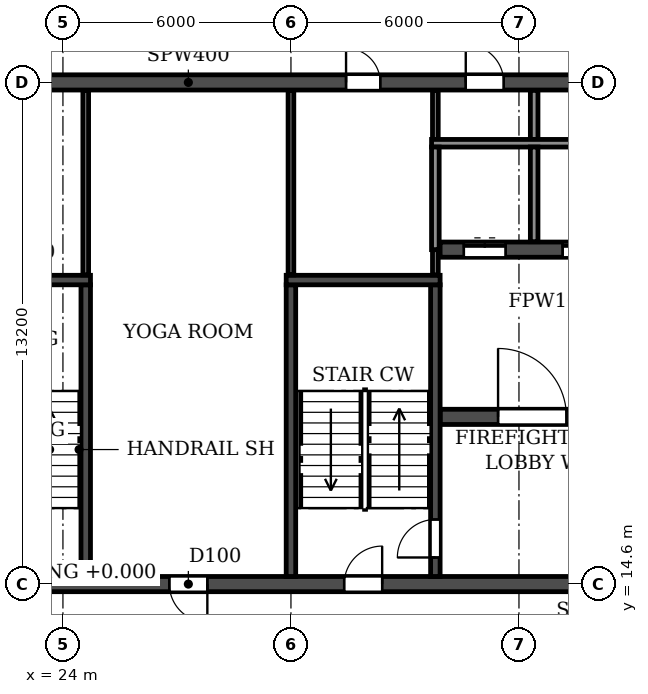
"""IFC4 building model, lengths in metres.
Left out: names, types, materials, properties, quantities, classifications, styles, units other than length and angle.
Written with IfcOpenShell. Run it as: python <this file> out.ifc"""

import sys

from ifc_helpers import new_model, si_unit, direction, frame, frame_2d, origin, place, context, subcontext, project, spatial, rectangle, extrude, element, fill, save


model = new_model("IFC4")
c1 = context("Model", 3, precision=1e-05, world=origin(), true_north=direction((0.0, 1.0)))
c2 = subcontext(c1, "Body", "Model", "MODEL_VIEW")
j1 = project(units=[si_unit("LENGTHUNIT", "METRE"), si_unit("PLANEANGLEUNIT", "RADIAN")], contexts=[c1])
p1 = place(None, origin())
s1 = spatial("IfcSite", under=j1, at=p1, CompositionType="ELEMENT")
p2 = place(p1, origin())
s2 = spatial("IfcBuilding", under=s1, at=p2, CompositionType="ELEMENT")
p3 = place(p2, frame((0.0, 0.0, 191.7)))
s3 = spatial("IfcBuildingStorey", under=s2, at=p3, CompositionType="ELEMENT", Elevation=191.7)
p4 = place(p3, frame((18.2, 14.6, 0.0), z_axis=(0.0, 0.0, 1.0), x_axis=(1.0, 0.0, 0.0)))
e1 = element("IfcWall", 1, at=p4, inside=s3, PredefinedType="SOLIDWALL", context=c2, shape_type="SweptSolid", body=[
    extrude(rectangle(XDim=65.6, YDim=0.4, at=frame_2d((32.8, 0.0))), origin(), (0.0, 0.0, 1.0), 3.08),
])
p5 = place(p4, frame((0.7, 0.0, 0.0)))
e2 = element("IfcOpeningElement", 2, at=p5, cuts=e1, PredefinedType="OPENING", context=c2, shape_type="SweptSolid", body=[
    extrude(rectangle(XDim=1.0, YDim=2.1, at=frame_2d((0.5, 1.05))), frame((0.0, 0.21, 0.0), z_axis=(0.0, -1.0, 0.0), x_axis=(1.0, 0.0, 0.0)), (0.0, 0.0, 1.0), 0.42),
])
p6 = place(p4, frame((8.6, 0.0, 0.0)))
e3 = element("IfcOpeningElement", 3, at=p6, cuts=e1, PredefinedType="OPENING", context=c2, shape_type="SweptSolid", body=[
    extrude(rectangle(XDim=1.0, YDim=2.1, at=frame_2d((0.5, 1.05))), frame((0.0, 0.21, 0.0), z_axis=(0.0, -1.0, 0.0), x_axis=(1.0, 0.0, 0.0)), (0.0, 0.0, 1.0), 0.42),
])
p7 = place(p4, frame((13.2, 0.0, 0.0)))
e4 = element("IfcOpeningElement", 4, at=p7, cuts=e1, PredefinedType="OPENING", context=c2, shape_type="SweptSolid", body=[
    extrude(rectangle(XDim=1.0, YDim=2.1, at=frame_2d((0.5, 1.05))), frame((0.0, 0.21, 0.0), z_axis=(0.0, -1.0, 0.0), x_axis=(1.0, 0.0, 0.0)), (0.0, 0.0, 1.0), 0.42),
])
p8 = place(p4, frame((25.55, 0.0, 0.0)))
e5 = element("IfcOpeningElement", 5, at=p8, cuts=e1, PredefinedType="OPENING", context=c2, shape_type="SweptSolid", body=[
    extrude(rectangle(XDim=1.5, YDim=2.1, at=frame_2d((0.75, 1.05))), frame((0.0, 0.21, 0.0), z_axis=(0.0, -1.0, 0.0), x_axis=(1.0, 0.0, 0.0)), (0.0, 0.0, 1.0), 0.42),
])
p9 = place(p4, frame((29.7, 0.0, 0.0)))
e6 = element("IfcOpeningElement", 6, at=p9, cuts=e1, PredefinedType="OPENING", context=c2, shape_type="SweptSolid", body=[
    extrude(rectangle(XDim=1.0, YDim=2.1, at=frame_2d((0.5, 1.05))), frame((0.0, 0.21, 0.0), z_axis=(0.0, -1.0, 0.0), x_axis=(1.0, 0.0, 0.0)), (0.0, 0.0, 1.0), 0.42),
])
p10 = place(p4, frame((32.3, 0.0, 0.0)))
e7 = element("IfcOpeningElement", 7, at=p10, cuts=e1, PredefinedType="OPENING", context=c2, shape_type="SweptSolid", body=[
    extrude(rectangle(XDim=1.0, YDim=2.1, at=frame_2d((0.5, 1.05))), frame((0.0, 0.21, 0.0), z_axis=(0.0, -1.0, 0.0), x_axis=(1.0, 0.0, 0.0)), (0.0, 0.0, 1.0), 0.42),
])
p11 = place(p4, frame((34.9, 0.0, 0.0)))
e8 = element("IfcOpeningElement", 8, at=p11, cuts=e1, PredefinedType="OPENING", context=c2, shape_type="SweptSolid", body=[
    extrude(rectangle(XDim=1.0, YDim=2.1, at=frame_2d((0.5, 1.05))), frame((0.0, 0.21, 0.0), z_axis=(0.0, -1.0, 0.0), x_axis=(1.0, 0.0, 0.0)), (0.0, 0.0, 1.0), 0.42),
])
p12 = place(p4, frame((38.55, 0.0, 0.0)))
e9 = element("IfcOpeningElement", 9, at=p12, cuts=e1, PredefinedType="OPENING", context=c2, shape_type="SweptSolid", body=[
    extrude(rectangle(XDim=1.5, YDim=2.1, at=frame_2d((0.75, 1.05))), frame((0.0, 0.21, 0.0), z_axis=(0.0, -1.0, 0.0), x_axis=(1.0, 0.0, 0.0)), (0.0, 0.0, 1.0), 0.42),
])
p13 = place(p4, frame((51.4, 0.0, 0.0)))
e10 = element("IfcOpeningElement", 10, at=p13, cuts=e1, PredefinedType="OPENING", context=c2, shape_type="SweptSolid", body=[
    extrude(rectangle(XDim=1.0, YDim=2.1, at=frame_2d((0.5, 1.05))), frame((0.0, 0.21, 0.0), z_axis=(0.0, -1.0, 0.0), x_axis=(1.0, 0.0, 0.0)), (0.0, 0.0, 1.0), 0.42),
])
p14 = place(p4, frame((56.0, 0.0, 0.0)))
e11 = element("IfcOpeningElement", 11, at=p14, cuts=e1, PredefinedType="OPENING", context=c2, shape_type="SweptSolid", body=[
    extrude(rectangle(XDim=1.0, YDim=2.1, at=frame_2d((0.5, 1.05))), frame((0.0, 0.21, 0.0), z_axis=(0.0, -1.0, 0.0), x_axis=(1.0, 0.0, 0.0)), (0.0, 0.0, 1.0), 0.42),
])
p15 = place(p4, frame((63.9, 0.0, 0.0)))
e12 = element("IfcOpeningElement", 12, at=p15, cuts=e1, PredefinedType="OPENING", context=c2, shape_type="SweptSolid", body=[
    extrude(rectangle(XDim=1.0, YDim=2.1, at=frame_2d((0.5, 1.05))), frame((0.0, 0.21, 0.0), z_axis=(0.0, -1.0, 0.0), x_axis=(1.0, 0.0, 0.0)), (0.0, 0.0, 1.0), 0.42),
])
p16 = place(p3, frame((18.2, 27.8, 0.0), z_axis=(0.0, 0.0, 1.0), x_axis=(1.0, 0.0, 0.0)))
e13 = element("IfcWall", 13, at=p16, inside=s3, PredefinedType="SOLIDWALL", context=c2, shape_type="SweptSolid", body=[
    extrude(rectangle(XDim=65.6, YDim=0.4, at=frame_2d((32.8, 0.0))), origin(), (0.0, 0.0, 1.0), 3.08),
])
p17 = place(p16, frame((0.7, 0.0, 0.0)))
e14 = element("IfcOpeningElement", 14, at=p17, cuts=e13, PredefinedType="OPENING", context=c2, shape_type="SweptSolid", body=[
    extrude(rectangle(XDim=1.0, YDim=2.1, at=frame_2d((0.5, 1.05))), frame((0.0, 0.21, 0.0), z_axis=(0.0, -1.0, 0.0), x_axis=(1.0, 0.0, 0.0)), (0.0, 0.0, 1.0), 0.42),
])
p18 = place(p16, frame((4.05, 0.0, 0.0)))
e15 = element("IfcOpeningElement", 15, at=p18, cuts=e13, PredefinedType="OPENING", context=c2, shape_type="SweptSolid", body=[
    extrude(rectangle(XDim=0.9, YDim=2.1, at=frame_2d((0.45, 1.05))), frame((0.0, 0.21, 0.0), z_axis=(0.0, -1.0, 0.0), x_axis=(1.0, 0.0, 0.0)), (0.0, 0.0, 1.0), 0.42),
])
p19 = place(p16, frame((13.25, 0.0, 0.0)))
e16 = element("IfcOpeningElement", 16, at=p19, cuts=e13, PredefinedType="OPENING", context=c2, shape_type="SweptSolid", body=[
    extrude(rectangle(XDim=0.9, YDim=2.1, at=frame_2d((0.45, 1.05))), frame((0.0, 0.21, 0.0), z_axis=(0.0, -1.0, 0.0), x_axis=(1.0, 0.0, 0.0)), (0.0, 0.0, 1.0), 0.42),
])
p20 = place(p16, frame((16.4, 0.0, 0.0)))
e17 = element("IfcOpeningElement", 17, at=p20, cuts=e13, PredefinedType="OPENING", context=c2, shape_type="SweptSolid", body=[
    extrude(rectangle(XDim=1.0, YDim=2.1, at=frame_2d((0.5, 1.05))), frame((0.0, 0.21, 0.0), z_axis=(0.0, -1.0, 0.0), x_axis=(1.0, 0.0, 0.0)), (0.0, 0.0, 1.0), 0.42),
])
p21 = place(p16, frame((21.6, 0.0, 0.0)))
e18 = element("IfcOpeningElement", 18, at=p21, cuts=e13, PredefinedType="OPENING", context=c2, shape_type="SweptSolid", body=[
    extrude(rectangle(XDim=1.0, YDim=2.1, at=frame_2d((0.5, 1.05))), frame((0.0, 0.21, 0.0), z_axis=(0.0, -1.0, 0.0), x_axis=(1.0, 0.0, 0.0)), (0.0, 0.0, 1.0), 0.42),
])
p22 = place(p16, frame((29.4, 0.0, 0.0)))
e19 = element("IfcOpeningElement", 19, at=p22, cuts=e13, PredefinedType="OPENING", context=c2, shape_type="SweptSolid", body=[
    extrude(rectangle(XDim=1.0, YDim=2.1, at=frame_2d((0.5, 1.05))), frame((0.0, 0.21, 0.0), z_axis=(0.0, -1.0, 0.0), x_axis=(1.0, 0.0, 0.0)), (0.0, 0.0, 1.0), 0.42),
])
p23 = place(p16, frame((32.3, 0.0, 0.0)))
e20 = element("IfcOpeningElement", 20, at=p23, cuts=e13, PredefinedType="OPENING", context=c2, shape_type="SweptSolid", body=[
    extrude(rectangle(XDim=1.0, YDim=2.1, at=frame_2d((0.5, 1.05))), frame((0.0, 0.21, 0.0), z_axis=(0.0, -1.0, 0.0), x_axis=(1.0, 0.0, 0.0)), (0.0, 0.0, 1.0), 0.42),
])
p24 = place(p16, frame((35.2, 0.0, 0.0)))
e21 = element("IfcOpeningElement", 21, at=p24, cuts=e13, PredefinedType="OPENING", context=c2, shape_type="SweptSolid", body=[
    extrude(rectangle(XDim=1.0, YDim=2.1, at=frame_2d((0.5, 1.05))), frame((0.0, 0.21, 0.0), z_axis=(0.0, -1.0, 0.0), x_axis=(1.0, 0.0, 0.0)), (0.0, 0.0, 1.0), 0.42),
])
p25 = place(p16, frame((37.8, 0.0, 0.0)))
e22 = element("IfcOpeningElement", 22, at=p25, cuts=e13, PredefinedType="OPENING", context=c2, shape_type="SweptSolid", body=[
    extrude(rectangle(XDim=1.0, YDim=2.1, at=frame_2d((0.5, 1.05))), frame((0.0, 0.21, 0.0), z_axis=(0.0, -1.0, 0.0), x_axis=(1.0, 0.0, 0.0)), (0.0, 0.0, 1.0), 0.42),
])
p26 = place(p16, frame((41.7, 0.0, 0.0)))
e23 = element("IfcOpeningElement", 23, at=p26, cuts=e13, PredefinedType="OPENING", context=c2, shape_type="SweptSolid", body=[
    extrude(rectangle(XDim=1.0, YDim=2.1, at=frame_2d((0.5, 1.05))), frame((0.0, 0.21, 0.0), z_axis=(0.0, -1.0, 0.0), x_axis=(1.0, 0.0, 0.0)), (0.0, 0.0, 1.0), 0.42),
])
p27 = place(p16, frame((45.6, 0.0, 0.0)))
e24 = element("IfcOpeningElement", 24, at=p27, cuts=e13, PredefinedType="OPENING", context=c2, shape_type="SweptSolid", body=[
    extrude(rectangle(XDim=1.0, YDim=2.1, at=frame_2d((0.5, 1.05))), frame((0.0, 0.21, 0.0), z_axis=(0.0, -1.0, 0.0), x_axis=(1.0, 0.0, 0.0)), (0.0, 0.0, 1.0), 0.42),
])
p28 = place(p16, frame((48.2, 0.0, 0.0)))
e25 = element("IfcOpeningElement", 25, at=p28, cuts=e13, PredefinedType="OPENING", context=c2, shape_type="SweptSolid", body=[
    extrude(rectangle(XDim=1.0, YDim=2.1, at=frame_2d((0.5, 1.05))), frame((0.0, 0.21, 0.0), z_axis=(0.0, -1.0, 0.0), x_axis=(1.0, 0.0, 0.0)), (0.0, 0.0, 1.0), 0.42),
])
p29 = place(p16, frame((51.45, 0.0, 0.0)))
e26 = element("IfcOpeningElement", 26, at=p29, cuts=e13, PredefinedType="OPENING", context=c2, shape_type="SweptSolid", body=[
    extrude(rectangle(XDim=0.9, YDim=2.1, at=frame_2d((0.45, 1.05))), frame((0.0, 0.21, 0.0), z_axis=(0.0, -1.0, 0.0), x_axis=(1.0, 0.0, 0.0)), (0.0, 0.0, 1.0), 0.42),
])
p30 = place(p16, frame((60.65, 0.0, 0.0)))
e27 = element("IfcOpeningElement", 27, at=p30, cuts=e13, PredefinedType="OPENING", context=c2, shape_type="SweptSolid", body=[
    extrude(rectangle(XDim=0.9, YDim=2.1, at=frame_2d((0.45, 1.05))), frame((0.0, 0.21, 0.0), z_axis=(0.0, -1.0, 0.0), x_axis=(1.0, 0.0, 0.0)), (0.0, 0.0, 1.0), 0.42),
])
p31 = place(p16, frame((63.9, 0.0, 0.0)))
e28 = element("IfcOpeningElement", 28, at=p31, cuts=e13, PredefinedType="OPENING", context=c2, shape_type="SweptSolid", body=[
    extrude(rectangle(XDim=1.0, YDim=2.1, at=frame_2d((0.5, 1.05))), frame((0.0, 0.21, 0.0), z_axis=(0.0, -1.0, 0.0), x_axis=(1.0, 0.0, 0.0)), (0.0, 0.0, 1.0), 0.42),
])
p32 = place(p3, frame((33.925, 19.0, 0.0), z_axis=(0.0, 0.0, 1.0), x_axis=(1.0, 0.0, 0.0)))
e29 = element("IfcWall", 29, at=p32, inside=s3, PredefinedType="SOLIDWALL", context=c2, shape_type="SweptSolid", body=[
    extrude(rectangle(XDim=34.15, YDim=0.4, at=frame_2d((17.075, 0.0))), origin(), (0.0, 0.0, 1.0), 3.08),
])
p33 = place(p32, frame((16.175, 0.0, 0.0)))
e30 = element("IfcOpeningElement", 30, at=p33, cuts=e29, PredefinedType="OPENING", context=c2, shape_type="SweptSolid", body=[
    extrude(rectangle(XDim=1.8, YDim=2.1, at=frame_2d((0.9, 1.05))), frame((0.0, 0.21, 0.0), z_axis=(0.0, -1.0, 0.0), x_axis=(1.0, 0.0, 0.0)), (0.0, 0.0, 1.0), 0.42),
])
p34 = place(p32, frame((1.525, 0.0, 0.0)))
e31 = element("IfcOpeningElement", 31, at=p34, cuts=e29, PredefinedType="OPENING", context=c2, shape_type="SweptSolid", body=[
    extrude(rectangle(XDim=1.8, YDim=2.1, at=frame_2d((0.9, 1.05))), frame((0.0, 0.21, 0.0), z_axis=(0.0, -1.0, 0.0), x_axis=(1.0, 0.0, 0.0)), (0.0, 0.0, 1.0), 0.42),
])
p35 = place(p32, frame((30.825, 0.0, 0.0)))
e32 = element("IfcOpeningElement", 32, at=p35, cuts=e29, PredefinedType="OPENING", context=c2, shape_type="SweptSolid", body=[
    extrude(rectangle(XDim=1.8, YDim=2.1, at=frame_2d((0.9, 1.05))), frame((0.0, 0.21, 0.0), z_axis=(0.0, -1.0, 0.0), x_axis=(1.0, 0.0, 0.0)), (0.0, 0.0, 1.0), 0.42),
])
p36 = place(p3, frame((33.925, 23.4, 0.0), z_axis=(0.0, 0.0, 1.0), x_axis=(1.0, 0.0, 0.0)))
e33 = element("IfcWall", 33, at=p36, inside=s3, PredefinedType="SOLIDWALL", context=c2, shape_type="SweptSolid", body=[
    extrude(rectangle(XDim=34.15, YDim=0.4, at=frame_2d((17.075, 0.0))), origin(), (0.0, 0.0, 1.0), 3.08),
])
p37 = place(p36, frame((16.175, 0.0, 0.0)))
e34 = element("IfcOpeningElement", 34, at=p37, cuts=e33, PredefinedType="OPENING", context=c2, shape_type="SweptSolid", body=[
    extrude(rectangle(XDim=1.8, YDim=2.1, at=frame_2d((0.9, 1.05))), frame((0.0, 0.21, 0.0), z_axis=(0.0, -1.0, 0.0), x_axis=(1.0, 0.0, 0.0)), (0.0, 0.0, 1.0), 0.42),
])
p38 = place(p36, frame((0.625, 0.0, 0.0)))
e35 = element("IfcOpeningElement", 35, at=p38, cuts=e33, PredefinedType="OPENING", context=c2, shape_type="SweptSolid", body=[
    extrude(rectangle(XDim=1.1, YDim=2.1, at=frame_2d((0.55, 1.05))), frame((0.0, 0.21, 0.0), z_axis=(0.0, -1.0, 0.0), x_axis=(1.0, 0.0, 0.0)), (0.0, 0.0, 1.0), 0.42),
])
p39 = place(p36, frame((3.225, 0.0, 0.0)))
e36 = element("IfcOpeningElement", 36, at=p39, cuts=e33, PredefinedType="OPENING", context=c2, shape_type="SweptSolid", body=[
    extrude(rectangle(XDim=1.1, YDim=2.1, at=frame_2d((0.55, 1.05))), frame((0.0, 0.21, 0.0), z_axis=(0.0, -1.0, 0.0), x_axis=(1.0, 0.0, 0.0)), (0.0, 0.0, 1.0), 0.42),
])
p40 = place(p36, frame((5.825, 0.0, 0.0)))
e37 = element("IfcOpeningElement", 37, at=p40, cuts=e33, PredefinedType="OPENING", context=c2, shape_type="SweptSolid", body=[
    extrude(rectangle(XDim=1.1, YDim=2.1, at=frame_2d((0.55, 1.05))), frame((0.0, 0.21, 0.0), z_axis=(0.0, -1.0, 0.0), x_axis=(1.0, 0.0, 0.0)), (0.0, 0.0, 1.0), 0.42),
])
p41 = place(p36, frame((8.425, 0.0, 0.0)))
e38 = element("IfcOpeningElement", 38, at=p41, cuts=e33, PredefinedType="OPENING", context=c2, shape_type="SweptSolid", body=[
    extrude(rectangle(XDim=1.1, YDim=2.1, at=frame_2d((0.55, 1.05))), frame((0.0, 0.21, 0.0), z_axis=(0.0, -1.0, 0.0), x_axis=(1.0, 0.0, 0.0)), (0.0, 0.0, 1.0), 0.42),
])
p42 = place(p36, frame((11.025, 0.0, 0.0)))
e39 = element("IfcOpeningElement", 39, at=p42, cuts=e33, PredefinedType="OPENING", context=c2, shape_type="SweptSolid", body=[
    extrude(rectangle(XDim=1.1, YDim=2.1, at=frame_2d((0.55, 1.05))), frame((0.0, 0.21, 0.0), z_axis=(0.0, -1.0, 0.0), x_axis=(1.0, 0.0, 0.0)), (0.0, 0.0, 1.0), 0.42),
])
p43 = place(p36, frame((13.625, 0.0, 0.0)))
e40 = element("IfcOpeningElement", 40, at=p43, cuts=e33, PredefinedType="OPENING", context=c2, shape_type="SweptSolid", body=[
    extrude(rectangle(XDim=1.1, YDim=2.1, at=frame_2d((0.55, 1.05))), frame((0.0, 0.21, 0.0), z_axis=(0.0, -1.0, 0.0), x_axis=(1.0, 0.0, 0.0)), (0.0, 0.0, 1.0), 0.42),
])
p44 = place(p36, frame((27.225, 0.0, 0.0)))
e41 = element("IfcOpeningElement", 41, at=p44, cuts=e33, PredefinedType="OPENING", context=c2, shape_type="SweptSolid", body=[
    extrude(rectangle(XDim=1.1, YDim=2.1, at=frame_2d((0.55, 1.05))), frame((0.0, 0.21, 0.0), z_axis=(0.0, -1.0, 0.0), x_axis=(1.0, 0.0, 0.0)), (0.0, 0.0, 1.0), 0.42),
])
p45 = place(p3, frame((30.0, 14.8, 0.0), z_axis=(0.0, 0.0, 1.0), x_axis=(0.0, 1.0, 0.0)))
e42 = element("IfcWall", 42, at=p45, inside=s3, PredefinedType="SOLIDWALL", context=c2, shape_type="SweptSolid", body=[
    extrude(rectangle(XDim=7.675, YDim=0.25, at=frame_2d((3.837, 0.0))), origin(), (0.0, 0.0, 1.0), 3.08),
])
p46 = place(p3, frame((33.8, 14.8, 0.0), z_axis=(0.0, 0.0, 1.0), x_axis=(0.0, 1.0, 0.0)))
e43 = element("IfcWall", 43, at=p46, inside=s3, PredefinedType="SOLIDWALL", context=c2, shape_type="SweptSolid", body=[
    extrude(rectangle(XDim=7.675, YDim=0.25, at=frame_2d((3.837, 0.0))), origin(), (0.0, 0.0, 1.0), 3.08),
])
p47 = place(p46, frame((0.5, 0.0, 0.0)))
e44 = element("IfcOpeningElement", 44, at=p47, cuts=e43, PredefinedType="OPENING", context=c2, shape_type="SweptSolid", body=[
    extrude(rectangle(XDim=1.0, YDim=2.1, at=frame_2d((0.5, 1.05))), frame((0.0, 0.135, 0.0), z_axis=(0.0, -1.0, 0.0), x_axis=(1.0, 0.0, 0.0)), (0.0, 0.0, 1.0), 0.27),
])
p48 = place(p3, frame((29.875, 22.6, 0.0), z_axis=(0.0, 0.0, 1.0), x_axis=(1.0, 0.0, 0.0)))
e45 = element("IfcWall", 45, at=p48, inside=s3, PredefinedType="SOLIDWALL", context=c2, shape_type="SweptSolid", body=[
    extrude(rectangle(XDim=4.05, YDim=0.25, at=frame_2d((2.025, 0.0))), origin(), (0.0, 0.0, 1.0), 3.08),
])
p49 = place(p3, frame((24.6, 14.8, 0.0), z_axis=(0.0, 0.0, 1.0), x_axis=(0.0, 1.0, 0.0)))
e46 = element("IfcWall", 46, at=p49, inside=s3, PredefinedType="SOLIDWALL", context=c2, shape_type="SweptSolid", body=[
    extrude(rectangle(XDim=7.675, YDim=0.25, at=frame_2d((3.837, 0.0))), origin(), (0.0, 0.0, 1.0), 3.08),
])
p50 = place(p3, frame((20.675, 22.6, 0.0), z_axis=(0.0, 0.0, 1.0), x_axis=(1.0, 0.0, 0.0)))
e47 = element("IfcWall", 47, at=p50, inside=s3, PredefinedType="SOLIDWALL", context=c2, shape_type="SweptSolid", body=[
    extrude(rectangle(XDim=4.05, YDim=0.25, at=frame_2d((2.025, 0.0))), origin(), (0.0, 0.0, 1.0), 3.08),
])
p51 = place(p3, frame((36.4, 26.3, 0.0), z_axis=(0.0, 0.0, 1.0), x_axis=(0.0, 1.0, 0.0)))
e48 = element("IfcWall", 48, at=p51, inside=s3, PredefinedType="PARTITIONING", context=c2, shape_type="SweptSolid", body=[
    extrude(rectangle(XDim=1.29, YDim=0.2, at=frame_2d((0.645, 0.0))), origin(), (0.0, 0.0, 1.0), 3.08),
])
for number, where, z_axis, x_axis in (
    (49, (24.6, 22.735, 0.0), (0.0, 0.0, 1.0), (0.0, 1.0, 0.0)),
    (50, (30.0, 22.735, 0.0), (0.0, 0.0, 1.0), (0.0, 1.0, 0.0)),
):
    element("IfcWall", number, at=place(p3, frame(where, z_axis=z_axis, x_axis=x_axis)), inside=s3, PredefinedType="PARTITIONING", context=c2, shape_type="SweptSolid", body=[
        extrude(rectangle(XDim=4.855, YDim=0.15, at=frame_2d((2.427, 0.0))), origin(), (0.0, 0.0, 1.0), 3.08),
    ])
p52 = place(p3, frame((33.8, 22.735, 0.0), z_axis=(0.0, 0.0, 1.0), x_axis=(0.0, 1.0, 0.0)))
e51 = element("IfcWall", 51, at=p52, inside=s3, PredefinedType="PARTITIONING", context=c2, shape_type="SweptSolid", body=[
    extrude(rectangle(XDim=0.665, YDim=0.15, at=frame_2d((0.333, 0.0))), origin(), (0.0, 0.0, 1.0), 3.08),
])
p53 = place(p3, frame((33.8, 26.3, 0.0), z_axis=(0.0, 0.0, 1.0), x_axis=(0.0, 1.0, 0.0)))
e52 = element("IfcWall", 52, at=p53, inside=s3, PredefinedType="PARTITIONING", context=c2, shape_type="SweptSolid", body=[
    extrude(rectangle(XDim=1.29, YDim=0.15, at=frame_2d((0.645, 0.0))), origin(), (0.0, 0.0, 1.0), 3.08),
])
p54 = place(p3, frame((33.7, 26.2, 0.0), z_axis=(0.0, 0.0, 1.0), x_axis=(1.0, 0.0, 0.0)))
e53 = element("IfcWall", 53, at=p54, inside=s3, PredefinedType="PARTITIONING", context=c2, shape_type="SweptSolid", body=[
    extrude(rectangle(XDim=10.4, YDim=0.2, at=frame_2d((5.2, 0.0))), origin(), (0.0, 0.0, 1.0), 3.08),
])
p55 = place(p3, frame((33.8, 23.4, 0.0), z_axis=(0.0, 0.0, 1.0), x_axis=(0.0, 1.0, 0.0)))
e54 = element("IfcWall", 54, at=p55, inside=s3, PredefinedType="PARTITIONING", context=c2, shape_type="SweptSolid", body=[
    extrude(rectangle(XDim=2.7, YDim=0.2, at=frame_2d((1.35, 0.0))), origin(), (0.0, 0.0, 1.0), 3.08),
])
p56 = place(p3, frame((36.4, 23.61, 0.0), z_axis=(0.0, 0.0, 1.0), x_axis=(0.0, 1.0, 0.0)))
e55 = element("IfcWall", 55, at=p56, inside=s3, PredefinedType="PARTITIONING", context=c2, shape_type="SweptSolid", body=[
    extrude(rectangle(XDim=2.49, YDim=0.2, at=frame_2d((1.245, 0.0))), origin(), (0.0, 0.0, 1.0), 3.08),
])
p57 = place(p19, origin())
e56 = element("IfcDoor", 56, at=p57, inside=s3, OperationType="SINGLE_SWING_LEFT", PredefinedType="DOOR", context=c2, shape_type="SweptSolid", body=[
    extrude(rectangle(XDim=0.9, YDim=2.1, at=frame_2d((0.45, 1.05))), frame((0.0, 0.025, 0.0), z_axis=(0.0, -1.0, 0.0), x_axis=(1.0, 0.0, 0.0)), (0.0, 0.0, 1.0), 0.05),
])
fill(e16, e56)
p58 = place(p20, origin())
e57 = element("IfcDoor", 57, at=p58, inside=s3, OperationType="SINGLE_SWING_LEFT", PredefinedType="DOOR", context=c2, shape_type="SweptSolid", body=[
    extrude(rectangle(XDim=1.0, YDim=2.1, at=frame_2d((0.5, 1.05))), frame((0.0, 0.025, 0.0), z_axis=(0.0, -1.0, 0.0), x_axis=(1.0, 0.0, 0.0)), (0.0, 0.0, 1.0), 0.05),
])
fill(e17, e57)
p59 = place(p6, frame((1.0, 0.0, 0.0), z_axis=(0.0, 0.0, 1.0), x_axis=(-1.0, 0.0, 0.0)))
e58 = element("IfcDoor", 58, at=p59, inside=s3, OperationType="SINGLE_SWING_LEFT", PredefinedType="DOOR", context=c2, shape_type="SweptSolid", body=[
    extrude(rectangle(XDim=1.0, YDim=2.1, at=frame_2d((0.5, 1.05))), frame((0.0, 0.025, 0.0), z_axis=(0.0, -1.0, 0.0), x_axis=(1.0, 0.0, 0.0)), (0.0, 0.0, 1.0), 0.05),
])
fill(e3, e58)
p60 = place(p7, origin())
e59 = element("IfcDoor", 59, at=p60, inside=s3, OperationType="SINGLE_SWING_RIGHT", PredefinedType="DOOR", context=c2, shape_type="SweptSolid", body=[
    extrude(rectangle(XDim=1.0, YDim=2.1, at=frame_2d((0.5, 1.05))), frame((0.0, 0.025, 0.0), z_axis=(0.0, -1.0, 0.0), x_axis=(1.0, 0.0, 0.0)), (0.0, 0.0, 1.0), 0.05),
])
fill(e4, e59)
p61 = place(p47, origin())
e60 = element("IfcDoor", 60, at=p61, inside=s3, OperationType="SINGLE_SWING_LEFT", PredefinedType="DOOR", context=c2, shape_type="SweptSolid", body=[
    extrude(rectangle(XDim=1.0, YDim=2.1, at=frame_2d((0.5, 1.05))), frame((0.0, 0.025, 0.0), z_axis=(0.0, -1.0, 0.0), x_axis=(1.0, 0.0, 0.0)), (0.0, 0.0, 1.0), 0.05),
])
fill(e44, e60)
p62 = place(p38, origin())
e61 = element("IfcDoor", 61, at=p62, inside=s3, OperationType="DOUBLE_DOOR_SLIDING", PredefinedType="DOOR", context=c2, shape_type="SweptSolid", body=[
    extrude(rectangle(XDim=1.1, YDim=2.1, at=frame_2d((0.55, 1.05))), frame((0.0, 0.025, 0.0), z_axis=(0.0, -1.0, 0.0), x_axis=(1.0, 0.0, 0.0)), (0.0, 0.0, 1.0), 0.05),
])
fill(e35, e61)
p63 = place(p34, origin())
e62 = element("IfcDoor", 62, at=p63, inside=s3, OperationType="DOUBLE_DOOR_SINGLE_SWING", PredefinedType="DOOR", context=c2, shape_type="SweptSolid", body=[
    extrude(rectangle(XDim=1.8, YDim=2.1, at=frame_2d((0.9, 1.05))), frame((0.0, 0.025, 0.0), z_axis=(0.0, -1.0, 0.0), x_axis=(1.0, 0.0, 0.0)), (0.0, 0.0, 1.0), 0.05),
])
fill(e31, e62)
p64 = place(p39, origin())
e63 = element("IfcDoor", 63, at=p64, inside=s3, OperationType="DOUBLE_DOOR_SLIDING", PredefinedType="DOOR", context=c2, shape_type="SweptSolid", body=[
    extrude(rectangle(XDim=1.1, YDim=2.1, at=frame_2d((0.55, 1.05))), frame((0.0, 0.025, 0.0), z_axis=(0.0, -1.0, 0.0), x_axis=(1.0, 0.0, 0.0)), (0.0, 0.0, 1.0), 0.05),
])
fill(e36, e63)
save(model, sys.argv[1])
